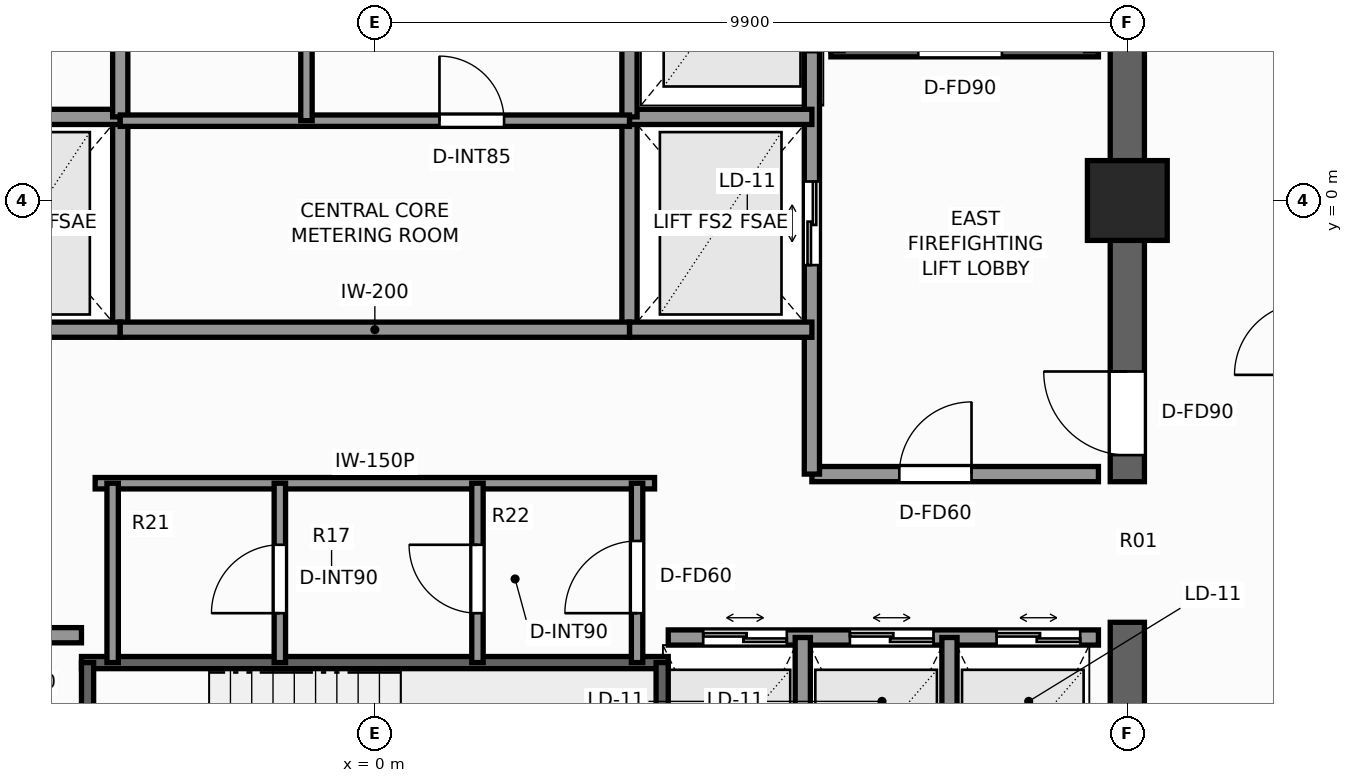
"""IFC4 building model, lengths in metres.
Left out: names, types, materials, properties, quantities, classifications, styles, units other than length and angle.
Written with IfcOpenShell. Run it as: python <this file> out.ifc"""

import sys

from ifc_helpers import new_model, si_unit, direction, frame, frame_2d, origin, origin_2d, place, context, subcontext, project, spatial, rectangle, extrude, element, fill, save


model = new_model("IFC4")
c1 = context("Model", 3, precision=1e-05, world=origin(), true_north=direction((0.0, 1.0)))
c2 = subcontext(c1, "Body", "Model", "MODEL_VIEW")
j1 = project(units=[si_unit("LENGTHUNIT", "METRE"), si_unit("PLANEANGLEUNIT", "RADIAN")], contexts=[c1])
p1 = place(None, origin())
s1 = spatial("IfcSite", under=j1, at=p1, CompositionType="ELEMENT")
p2 = place(p1, origin())
s2 = spatial("IfcBuilding", under=s1, at=p2, CompositionType="ELEMENT")
p3 = place(p2, frame((0.0, 0.0, 240.9)))
s3 = spatial("IfcBuildingStorey", under=s2, at=p3, CompositionType="ELEMENT", Elevation=240.9)
p4 = place(p3, frame((9.9, -9.675, 0.0), z_axis=(0.0, 0.0, 1.0), x_axis=(0.0, 1.0, 0.0)))
e1 = element("IfcWall", 1, at=p4, inside=s3, PredefinedType="SHEAR", context=c2, shape_type="SweptSolid", body=[
    extrude(rectangle(XDim=4.125, YDim=0.45, at=frame_2d((2.062, 0.0))), origin(), (0.0, 0.0, 1.0), 3.5),
])
p5 = place(p3, frame((9.9, -3.7, 0.0), z_axis=(0.0, 0.0, 1.0), x_axis=(0.0, 1.0, 0.0)))
e2 = element("IfcWall", 2, at=p5, inside=s3, PredefinedType="SHEAR", context=c2, shape_type="SweptSolid", body=[
    extrude(rectangle(XDim=13.375, YDim=0.45, at=frame_2d((6.688, 0.0))), origin(), (0.0, 0.0, 1.0), 3.5),
])
p6 = place(p5, frame((0.35, 0.0, 0.0)))
e3 = element("IfcOpeningElement", 3, at=p6, cuts=e2, PredefinedType="OPENING", context=c2, shape_type="SweptSolid", body=[
    extrude(rectangle(XDim=1.1, YDim=2.2, at=frame_2d((0.55, 1.1))), frame((0.0, 0.235, 0.0), z_axis=(0.0, -1.0, 0.0), x_axis=(1.0, 0.0, 0.0)), (0.0, 0.0, 1.0), 0.47),
])
p7 = place(p3, frame((9.9, 0.0, 0.0), z_axis=(0.0, 0.0, 1.0), x_axis=(1.0, 0.0, 0.0)))
e4 = element("IfcColumn", 4, at=p7, inside=s3, PredefinedType="COLUMN", context=c2, shape_type="SweptSolid", body=[
    extrude(rectangle(XDim=1.05, YDim=1.05, at=origin_2d()), origin(), (0.0, 0.0, 1.0), 3.5),
])
p8 = place(p3, frame((6.0, 1.97, 0.0), z_axis=(0.0, 0.0, 1.0), x_axis=(1.0, 0.0, 0.0)))
e5 = element("IfcWall", 5, at=p8, inside=s3, PredefinedType="SHEAR", context=c2, shape_type="SweptSolid", body=[
    extrude(rectangle(XDim=3.52, YDim=0.16, at=frame_2d((1.76, 0.0))), origin(), (0.0, 0.0, 1.0), 3.5),
])
p9 = place(p8, frame((1.15, 0.0, 0.0)))
e6 = element("IfcOpeningElement", 6, at=p9, cuts=e5, PredefinedType="OPENING", context=c2, shape_type="SweptSolid", body=[
    extrude(rectangle(XDim=1.1, YDim=2.2, at=frame_2d((0.55, 1.1))), frame((0.0, 0.09, 0.0), z_axis=(0.0, -1.0, 0.0), x_axis=(1.0, 0.0, 0.0)), (0.0, 0.0, 1.0), 0.18),
])
p10 = place(p3, frame((-3.86, -6.08, 0.0), z_axis=(0.0, 0.0, 1.0), x_axis=(1.0, 0.0, 0.0)))
e7 = element("IfcWall", 7, at=p10, inside=s3, PredefinedType="SHEAR", context=c2, shape_type="SweptSolid", body=[
    extrude(rectangle(XDim=7.72, YDim=0.16, at=frame_2d((3.86, 0.0))), origin(), (0.0, 0.0, 1.0), 3.5),
])
for number, where, z_axis, x_axis in (
    (8, (-3.78, -9.43, 0.0), (0.0, 0.0, 1.0), (0.0, 1.0, 0.0)),
    (9, (3.78, -9.43, 0.0), (0.0, 0.0, 1.0), (0.0, 1.0, 0.0)),
):
    element("IfcWall", number, at=place(p3, frame(where, z_axis=z_axis, x_axis=x_axis)), inside=s3, PredefinedType="SHEAR", context=c2, shape_type="SweptSolid", body=[
        extrude(rectangle(XDim=3.35, YDim=0.16, at=frame_2d((1.675, 0.0))), origin(), (0.0, 0.0, 1.0), 3.5),
    ])
p11 = place(p3, frame((-3.35, -1.7, 0.0), z_axis=(0.0, 0.0, 1.0), x_axis=(0.0, 1.0, 0.0)))
e10 = element("IfcWall", 10, at=p11, inside=s3, PredefinedType="SOLIDWALL", context=c2, shape_type="SweptSolid", body=[
    extrude(rectangle(XDim=2.8, YDim=0.2, at=frame_2d((1.4, 0.0))), origin(), (0.0, 0.0, 1.0), 3.25),
])
for number, where, z_axis, x_axis in (
    (11, (-5.75, -1.7, 0.0), (0.0, 0.0, 1.0), (1.0, 0.0, 0.0)),
    (12, (-5.75, 1.1, 0.0), (0.0, 0.0, 1.0), (1.0, 0.0, 0.0)),
):
    element("IfcWall", number, at=place(p3, frame(where, z_axis=z_axis, x_axis=x_axis)), inside=s3, PredefinedType="SOLIDWALL", context=c2, shape_type="SweptSolid", body=[
        extrude(rectangle(XDim=2.4, YDim=0.2, at=frame_2d((1.2, 0.0))), origin(), (0.0, 0.0, 1.0), 3.25),
    ])
p12 = place(p3, frame((5.75, -3.6, 0.0), z_axis=(0.0, 0.0, 1.0), x_axis=(1.0, 0.0, 0.0)))
e13 = element("IfcWall", 13, at=p12, inside=s3, PredefinedType="SOLIDWALL", context=c2, shape_type="SweptSolid", body=[
    extrude(rectangle(XDim=3.77, YDim=0.2, at=frame_2d((1.885, 0.0))), origin(), (0.0, 0.0, 1.0), 3.25),
])
p13 = place(p12, frame((1.15, 0.0, 0.0)))
e14 = element("IfcOpeningElement", 14, at=p13, cuts=e13, PredefinedType="OPENING", context=c2, shape_type="SweptSolid", body=[
    extrude(rectangle(XDim=0.95, YDim=2.06, at=frame_2d((0.475, 1.03))), frame((0.0, 0.11, 0.0), z_axis=(0.0, -1.0, 0.0), x_axis=(1.0, 0.0, 0.0)), (0.0, 0.0, 1.0), 0.22),
])
p14 = place(p3, frame((5.75, -3.6, 0.0), z_axis=(0.0, 0.0, 1.0), x_axis=(0.0, 1.0, 0.0)))
e15 = element("IfcWall", 15, at=p14, inside=s3, PredefinedType="SOLIDWALL", context=c2, shape_type="SweptSolid", body=[
    extrude(rectangle(XDim=5.57, YDim=0.2, at=frame_2d((2.785, 0.0))), origin(), (0.0, 0.0, 1.0), 3.25),
])
p15 = place(p14, frame((2.75, 0.0, 0.0)))
e16 = element("IfcOpeningElement", 16, at=p15, cuts=e15, PredefinedType="OPENING", context=c2, shape_type="SweptSolid", body=[
    extrude(rectangle(XDim=1.1, YDim=2.2, at=frame_2d((0.55, 1.1))), frame((0.0, 0.11, 0.0), z_axis=(0.0, -1.0, 0.0), x_axis=(1.0, 0.0, 0.0)), (0.0, 0.0, 1.0), 0.22),
])
p16 = place(p3, frame((3.35, -1.7, 0.0), z_axis=(0.0, 0.0, 1.0), x_axis=(0.0, 1.0, 0.0)))
e17 = element("IfcWall", 17, at=p16, inside=s3, PredefinedType="SOLIDWALL", context=c2, shape_type="SweptSolid", body=[
    extrude(rectangle(XDim=2.8, YDim=0.2, at=frame_2d((1.4, 0.0))), origin(), (0.0, 0.0, 1.0), 3.25),
])
for number, where, z_axis, x_axis in (
    (18, (3.35, -1.7, 0.0), (0.0, 0.0, 1.0), (1.0, 0.0, 0.0)),
    (19, (3.35, 1.1, 0.0), (0.0, 0.0, 1.0), (1.0, 0.0, 0.0)),
):
    element("IfcWall", number, at=place(p3, frame(where, z_axis=z_axis, x_axis=x_axis)), inside=s3, PredefinedType="SOLIDWALL", context=c2, shape_type="SweptSolid", body=[
        extrude(rectangle(XDim=2.4, YDim=0.2, at=frame_2d((1.2, 0.0))), origin(), (0.0, 0.0, 1.0), 3.25),
    ])
p17 = place(p3, frame((-9.52, -5.72, 0.0), z_axis=(0.0, 0.0, 1.0), x_axis=(1.0, 0.0, 0.0)))
e20 = element("IfcWall", 20, at=p17, inside=s3, PredefinedType="SOLIDWALL", context=c2, shape_type="SweptSolid", body=[
    extrude(rectangle(XDim=5.66, YDim=0.2, at=frame_2d((2.83, 0.0))), origin(), (0.0, 0.0, 1.0), 3.25),
])
p18 = place(p17, frame((3.6, 0.0, 0.0)))
e21 = element("IfcOpeningElement", 21, at=p18, cuts=e20, PredefinedType="OPENING", context=c2, shape_type="SweptSolid", body=[
    extrude(rectangle(XDim=0.95, YDim=2.06, at=frame_2d((0.475, 1.03))), frame((0.0, 0.11, 0.0), z_axis=(0.0, -1.0, 0.0), x_axis=(1.0, 0.0, 0.0)), (0.0, 0.0, 1.0), 0.22),
])
p19 = place(p17, frame((0.85, 0.0, 0.0)))
e22 = element("IfcOpeningElement", 22, at=p19, cuts=e20, PredefinedType="OPENING", context=c2, shape_type="SweptSolid", body=[
    extrude(rectangle(XDim=0.85, YDim=2.03, at=frame_2d((0.425, 1.015))), frame((0.0, 0.11, 0.0), z_axis=(0.0, -1.0, 0.0), x_axis=(1.0, 0.0, 0.0)), (0.0, 0.0, 1.0), 0.22),
])
p20 = place(p3, frame((3.86, -5.75, 0.0), z_axis=(0.0, 0.0, 1.0), x_axis=(1.0, 0.0, 0.0)))
e23 = element("IfcWall", 23, at=p20, inside=s3, PredefinedType="SOLIDWALL", context=c2, shape_type="SweptSolid", body=[
    extrude(rectangle(XDim=5.66, YDim=0.2, at=frame_2d((2.83, 0.0))), origin(), (0.0, 0.0, 1.0), 3.25),
])
p21 = place(p20, frame((0.46, 0.0, 0.0)))
e24 = element("IfcOpeningElement", 24, at=p21, cuts=e23, PredefinedType="OPENING", context=c2, shape_type="SweptSolid", body=[
    extrude(rectangle(XDim=1.1, YDim=2.2, at=frame_2d((0.55, 1.1))), frame((0.0, 0.11, 0.0), z_axis=(0.0, -1.0, 0.0), x_axis=(1.0, 0.0, 0.0)), (0.0, 0.0, 1.0), 0.22),
])
p22 = place(p20, frame((2.39, 0.0, 0.0)))
e25 = element("IfcOpeningElement", 25, at=p22, cuts=e23, PredefinedType="OPENING", context=c2, shape_type="SweptSolid", body=[
    extrude(rectangle(XDim=1.1, YDim=2.2, at=frame_2d((0.55, 1.1))), frame((0.0, 0.11, 0.0), z_axis=(0.0, -1.0, 0.0), x_axis=(1.0, 0.0, 0.0)), (0.0, 0.0, 1.0), 0.22),
])
p23 = place(p20, frame((4.32, 0.0, 0.0)))
e26 = element("IfcOpeningElement", 26, at=p23, cuts=e23, PredefinedType="OPENING", context=c2, shape_type="SweptSolid", body=[
    extrude(rectangle(XDim=1.1, YDim=2.2, at=frame_2d((0.55, 1.1))), frame((0.0, 0.11, 0.0), z_axis=(0.0, -1.0, 0.0), x_axis=(1.0, 0.0, 0.0)), (0.0, 0.0, 1.0), 0.22),
])
for number, where, z_axis, x_axis in (
    (27, (5.63, -9.52, 0.0), (0.0, 0.0, 1.0), (0.0, 1.0, 0.0)),
    (28, (7.56, -9.52, 0.0), (0.0, 0.0, 1.0), (0.0, 1.0, 0.0)),
):
    element("IfcWall", number, at=place(p3, frame(where, z_axis=z_axis, x_axis=x_axis)), inside=s3, PredefinedType="SOLIDWALL", context=c2, shape_type="SweptSolid", body=[
        extrude(rectangle(XDim=3.77, YDim=0.2, at=frame_2d((1.885, 0.0))), origin(), (0.0, 0.0, 1.0), 3.25),
    ])
p24 = place(p3, frame((-3.35, -1.7, 0.0), z_axis=(0.0, 0.0, 1.0), x_axis=(1.0, 0.0, 0.0)))
e29 = element("IfcWall", 29, at=p24, inside=s3, PredefinedType="SOLIDWALL", context=c2, shape_type="SweptSolid", body=[
    extrude(rectangle(XDim=6.7, YDim=0.2, at=frame_2d((3.35, 0.0))), origin(), (0.0, 0.0, 1.0), 3.25),
])
for number, where, z_axis, x_axis in (
    (30, (-3.35, 1.1, 0.0), (0.0, 0.0, 1.0), (0.0, 1.0, 0.0)),
    (31, (3.35, 1.1, 0.0), (0.0, 0.0, 1.0), (0.0, 1.0, 0.0)),
):
    element("IfcWall", number, at=place(p3, frame(where, z_axis=z_axis, x_axis=x_axis)), inside=s3, PredefinedType="SOLIDWALL", context=c2, shape_type="SweptSolid", body=[
        extrude(rectangle(XDim=3.2, YDim=0.2, at=frame_2d((1.6, 0.0))), origin(), (0.0, 0.0, 1.0), 3.25),
    ])
p25 = place(p3, frame((-3.35, 1.05, 0.0), z_axis=(0.0, 0.0, 1.0), x_axis=(1.0, 0.0, 0.0)))
e32 = element("IfcWall", 32, at=p25, inside=s3, PredefinedType="PARTITIONING", context=c2, shape_type="SweptSolid", body=[
    extrude(rectangle(XDim=6.7, YDim=0.15, at=frame_2d((3.35, 0.0))), origin(), (0.0, 0.0, 1.0), 3.25),
])
p26 = place(p25, frame((4.2, 0.0, 0.0)))
e33 = element("IfcOpeningElement", 33, at=p26, cuts=e32, PredefinedType="OPENING", context=c2, shape_type="SweptSolid", body=[
    extrude(rectangle(XDim=0.85, YDim=2.03, at=frame_2d((0.425, 1.015))), frame((0.0, 0.085, 0.0), z_axis=(0.0, -1.0, 0.0), x_axis=(1.0, 0.0, 0.0)), (0.0, 0.0, 1.0), 0.17),
])
p27 = place(p3, frame((-0.9, 1.05, 0.0), z_axis=(0.0, 0.0, 1.0), x_axis=(0.0, 1.0, 0.0)))
e34 = element("IfcWall", 34, at=p27, inside=s3, PredefinedType="PARTITIONING", context=c2, shape_type="SweptSolid", body=[
    extrude(rectangle(XDim=3.25, YDim=0.15, at=frame_2d((1.625, 0.0))), origin(), (0.0, 0.0, 1.0), 3.25),
])
p28 = place(p27, frame((1.1, 0.0, 0.0)))
e35 = element("IfcOpeningElement", 35, at=p28, cuts=e34, PredefinedType="OPENING", context=c2, shape_type="SweptSolid", body=[
    extrude(rectangle(XDim=0.85, YDim=2.03, at=frame_2d((0.425, 1.015))), frame((0.0, 0.085, 0.0), z_axis=(0.0, -1.0, 0.0), x_axis=(1.0, 0.0, 0.0)), (0.0, 0.0, 1.0), 0.17),
])
p29 = place(p3, frame((-3.68, -3.72, 0.0), z_axis=(0.0, 0.0, 1.0), x_axis=(1.0, 0.0, 0.0)))
e36 = element("IfcWall", 36, at=p29, inside=s3, PredefinedType="PARTITIONING", context=c2, shape_type="SweptSolid", body=[
    extrude(rectangle(XDim=7.36, YDim=0.15, at=frame_2d((3.68, 0.0))), origin(), (0.0, 0.0, 1.0), 3.25),
])
p30 = place(p3, frame((3.45, -6.08, 0.0), z_axis=(0.0, 0.0, 1.0), x_axis=(0.0, 1.0, 0.0)))
e37 = element("IfcWall", 37, at=p30, inside=s3, PredefinedType="PARTITIONING", context=c2, shape_type="SweptSolid", body=[
    extrude(rectangle(XDim=2.36, YDim=0.15, at=frame_2d((1.18, 0.0))), origin(), (0.0, 0.0, 1.0), 3.25),
])
p31 = place(p30, frame((0.65, 0.0, 0.0)))
e38 = element("IfcOpeningElement", 38, at=p31, cuts=e37, PredefinedType="OPENING", context=c2, shape_type="SweptSolid", body=[
    extrude(rectangle(XDim=0.95, YDim=2.06, at=frame_2d((0.475, 1.03))), frame((0.0, 0.085, 0.0), z_axis=(0.0, -1.0, 0.0), x_axis=(1.0, 0.0, 0.0)), (0.0, 0.0, 1.0), 0.17),
])
p32 = place(p3, frame((-3.45, -6.08, 0.0), z_axis=(0.0, 0.0, 1.0), x_axis=(0.0, 1.0, 0.0)))
e39 = element("IfcWall", 39, at=p32, inside=s3, PredefinedType="PARTITIONING", context=c2, shape_type="SweptSolid", body=[
    extrude(rectangle(XDim=2.36, YDim=0.15, at=frame_2d((1.18, 0.0))), origin(), (0.0, 0.0, 1.0), 3.25),
])
p33 = place(p3, frame((1.35, -6.08, 0.0), z_axis=(0.0, 0.0, 1.0), x_axis=(0.0, 1.0, 0.0)))
e40 = element("IfcWall", 40, at=p33, inside=s3, PredefinedType="PARTITIONING", context=c2, shape_type="SweptSolid", body=[
    extrude(rectangle(XDim=2.36, YDim=0.15, at=frame_2d((1.18, 0.0))), origin(), (0.0, 0.0, 1.0), 3.25),
])
p34 = place(p33, frame((0.65, 0.0, 0.0)))
e41 = element("IfcOpeningElement", 41, at=p34, cuts=e40, PredefinedType="OPENING", context=c2, shape_type="SweptSolid", body=[
    extrude(rectangle(XDim=0.9, YDim=2.06, at=frame_2d((0.45, 1.03))), frame((0.0, 0.085, 0.0), z_axis=(0.0, -1.0, 0.0), x_axis=(1.0, 0.0, 0.0)), (0.0, 0.0, 1.0), 0.17),
])
p35 = place(p3, frame((-1.25, -6.08, 0.0), z_axis=(0.0, 0.0, 1.0), x_axis=(0.0, 1.0, 0.0)))
e42 = element("IfcWall", 42, at=p35, inside=s3, PredefinedType="PARTITIONING", context=c2, shape_type="SweptSolid", body=[
    extrude(rectangle(XDim=2.36, YDim=0.15, at=frame_2d((1.18, 0.0))), origin(), (0.0, 0.0, 1.0), 3.25),
])
p36 = place(p35, frame((0.65, 0.0, 0.0)))
e43 = element("IfcOpeningElement", 43, at=p36, cuts=e42, PredefinedType="OPENING", context=c2, shape_type="SweptSolid", body=[
    extrude(rectangle(XDim=0.9, YDim=2.06, at=frame_2d((0.45, 1.03))), frame((0.0, 0.085, 0.0), z_axis=(0.0, -1.0, 0.0), x_axis=(1.0, 0.0, 0.0)), (0.0, 0.0, 1.0), 0.17),
])
p37 = place(p9, origin())
e44 = element("IfcDoor", 44, at=p37, inside=s3, OperationType="SINGLE_SWING_RIGHT", PredefinedType="DOOR", context=c2, shape_type="SweptSolid", body=[
    extrude(rectangle(XDim=1.1, YDim=2.2, at=frame_2d((0.55, 1.1))), frame((0.0, 0.025, 0.0), z_axis=(0.0, -1.0, 0.0), x_axis=(1.0, 0.0, 0.0)), (0.0, 0.0, 1.0), 0.05),
])
fill(e6, e44)
p38 = place(p6, origin())
e45 = element("IfcDoor", 45, at=p38, inside=s3, OperationType="SINGLE_SWING_RIGHT", PredefinedType="DOOR", context=c2, shape_type="SweptSolid", body=[
    extrude(rectangle(XDim=1.1, YDim=2.2, at=frame_2d((0.55, 1.1))), frame((0.0, 0.025, 0.0), z_axis=(0.0, -1.0, 0.0), x_axis=(1.0, 0.0, 0.0)), (0.0, 0.0, 1.0), 0.05),
])
fill(e3, e45)
p39 = place(p15, origin())
e46 = element("IfcDoor", 46, at=p39, inside=s3, OperationType="DOUBLE_DOOR_SLIDING", PredefinedType="DOOR", context=c2, shape_type="SweptSolid", body=[
    extrude(rectangle(XDim=1.1, YDim=2.2, at=frame_2d((0.55, 1.1))), frame((0.0, 0.025, 0.0), z_axis=(0.0, -1.0, 0.0), x_axis=(1.0, 0.0, 0.0)), (0.0, 0.0, 1.0), 0.05),
])
fill(e16, e46)
p40 = place(p21, origin())
e47 = element("IfcDoor", 47, at=p40, inside=s3, OperationType="DOUBLE_DOOR_SLIDING", PredefinedType="DOOR", context=c2, shape_type="SweptSolid", body=[
    extrude(rectangle(XDim=1.1, YDim=2.2, at=frame_2d((0.55, 1.1))), frame((0.0, 0.025, 0.0), z_axis=(0.0, -1.0, 0.0), x_axis=(1.0, 0.0, 0.0)), (0.0, 0.0, 1.0), 0.05),
])
fill(e24, e47)
p41 = place(p22, origin())
e48 = element("IfcDoor", 48, at=p41, inside=s3, OperationType="DOUBLE_DOOR_SLIDING", PredefinedType="DOOR", context=c2, shape_type="SweptSolid", body=[
    extrude(rectangle(XDim=1.1, YDim=2.2, at=frame_2d((0.55, 1.1))), frame((0.0, 0.025, 0.0), z_axis=(0.0, -1.0, 0.0), x_axis=(1.0, 0.0, 0.0)), (0.0, 0.0, 1.0), 0.05),
])
fill(e25, e48)
p42 = place(p23, origin())
e49 = element("IfcDoor", 49, at=p42, inside=s3, OperationType="DOUBLE_DOOR_SLIDING", PredefinedType="DOOR", context=c2, shape_type="SweptSolid", body=[
    extrude(rectangle(XDim=1.1, YDim=2.2, at=frame_2d((0.55, 1.1))), frame((0.0, 0.025, 0.0), z_axis=(0.0, -1.0, 0.0), x_axis=(1.0, 0.0, 0.0)), (0.0, 0.0, 1.0), 0.05),
])
fill(e26, e49)
p43 = place(p13, origin())
e50 = element("IfcDoor", 50, at=p43, inside=s3, OperationType="SINGLE_SWING_RIGHT", PredefinedType="DOOR", context=c2, shape_type="SweptSolid", body=[
    extrude(rectangle(XDim=0.95, YDim=2.06, at=frame_2d((0.475, 1.03))), frame((0.0, 0.025, 0.0), z_axis=(0.0, -1.0, 0.0), x_axis=(1.0, 0.0, 0.0)), (0.0, 0.0, 1.0), 0.05),
])
fill(e14, e50)
p44 = place(p26, origin())
e51 = element("IfcDoor", 51, at=p44, inside=s3, OperationType="SINGLE_SWING_LEFT", PredefinedType="DOOR", context=c2, shape_type="SweptSolid", body=[
    extrude(rectangle(XDim=0.85, YDim=2.03, at=frame_2d((0.425, 1.015))), frame((0.0, 0.025, 0.0), z_axis=(0.0, -1.0, 0.0), x_axis=(1.0, 0.0, 0.0)), (0.0, 0.0, 1.0), 0.05),
])
fill(e33, e51)
p45 = place(p31, origin())
e52 = element("IfcDoor", 52, at=p45, inside=s3, OperationType="SINGLE_SWING_LEFT", PredefinedType="DOOR", context=c2, shape_type="SweptSolid", body=[
    extrude(rectangle(XDim=0.95, YDim=2.06, at=frame_2d((0.475, 1.03))), frame((0.0, 0.025, 0.0), z_axis=(0.0, -1.0, 0.0), x_axis=(1.0, 0.0, 0.0)), (0.0, 0.0, 1.0), 0.05),
])
fill(e38, e52)
p46 = place(p34, origin())
e53 = element("IfcDoor", 53, at=p46, inside=s3, OperationType="SINGLE_SWING_RIGHT", PredefinedType="DOOR", context=c2, shape_type="SweptSolid", body=[
    extrude(rectangle(XDim=0.9, YDim=2.06, at=frame_2d((0.45, 1.03))), frame((0.0, 0.025, 0.0), z_axis=(0.0, -1.0, 0.0), x_axis=(1.0, 0.0, 0.0)), (0.0, 0.0, 1.0), 0.05),
])
fill(e41, e53)
p47 = place(p36, origin())
e54 = element("IfcDoor", 54, at=p47, inside=s3, OperationType="SINGLE_SWING_LEFT", PredefinedType="DOOR", context=c2, shape_type="SweptSolid", body=[
    extrude(rectangle(XDim=0.9, YDim=2.06, at=frame_2d((0.45, 1.03))), frame((0.0, 0.025, 0.0), z_axis=(0.0, -1.0, 0.0), x_axis=(1.0, 0.0, 0.0)), (0.0, 0.0, 1.0), 0.05),
])
fill(e43, e54)
save(model, sys.argv[1])
